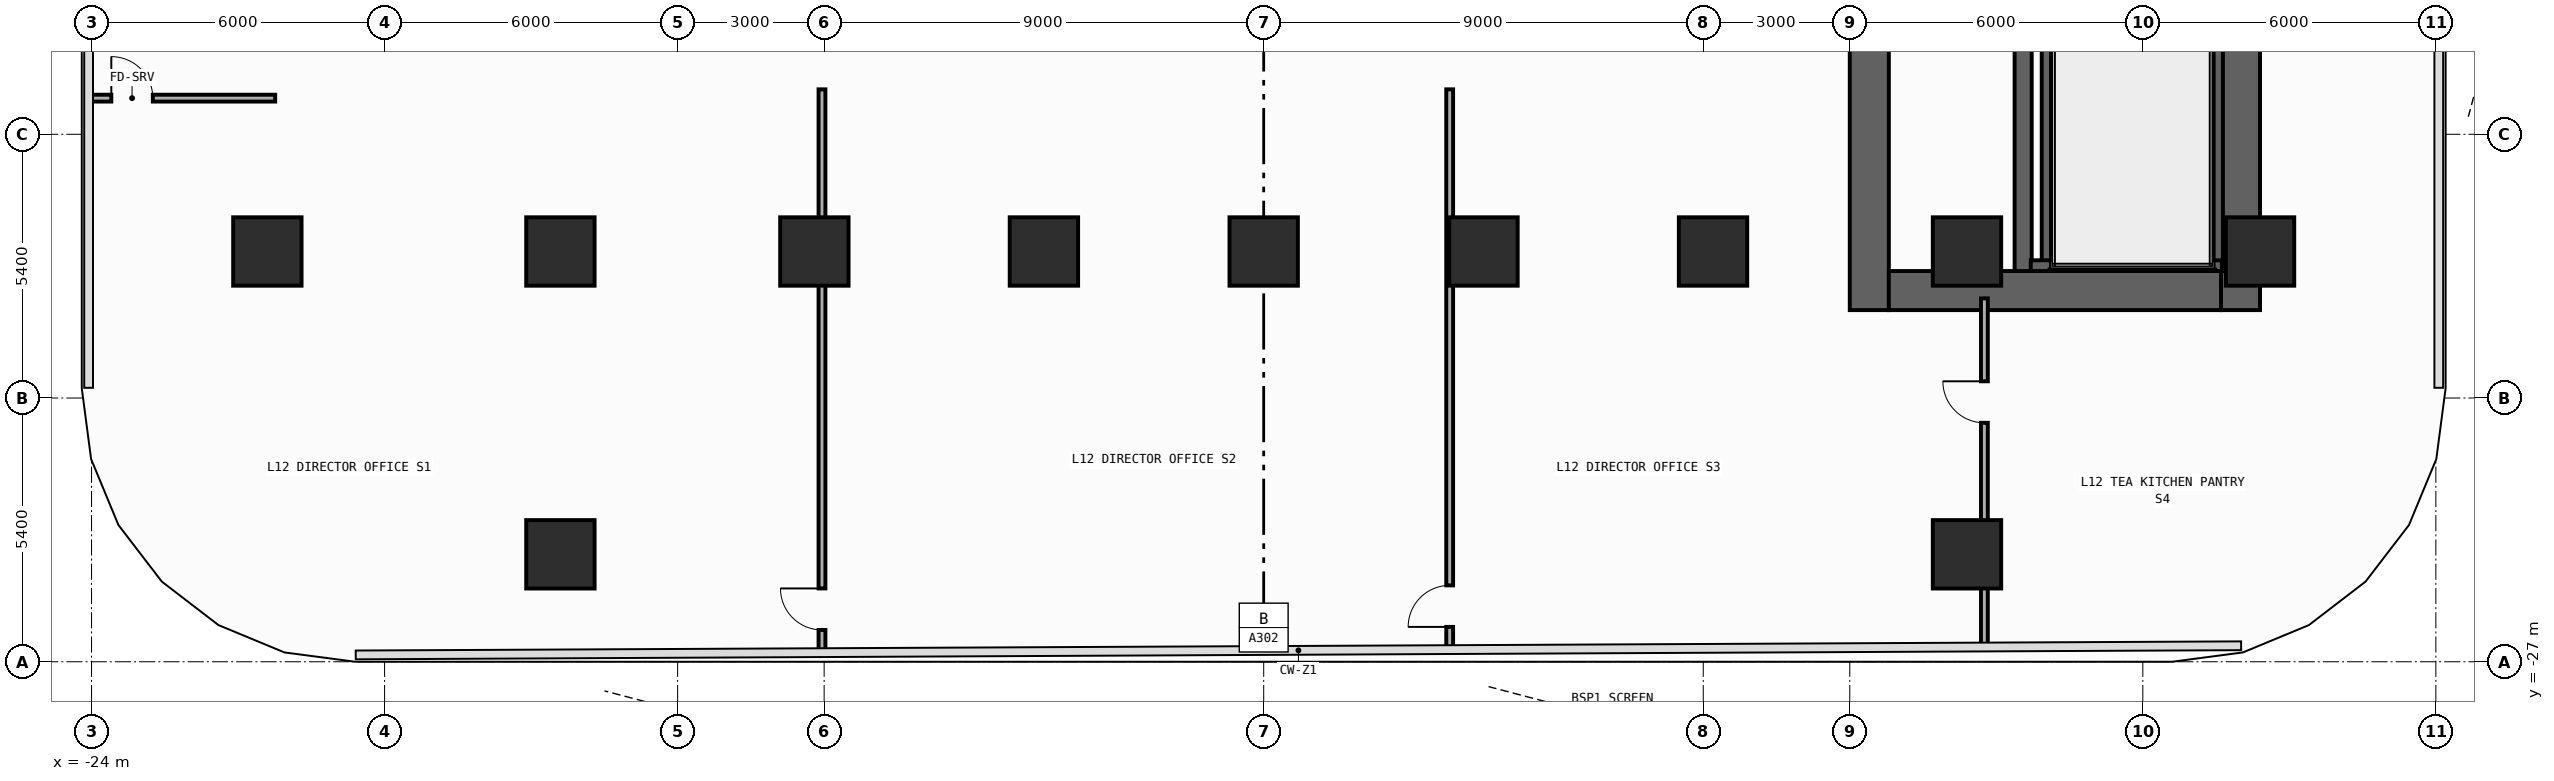
"""IFC4 building model, lengths in metres.
Left out: names, types, materials, properties, quantities, classifications, styles, units other than length and angle.
Written with IfcOpenShell. Run it as: python <this file> out.ifc"""

import sys

from ifc_helpers import new_model, si_unit, direction, frame, frame_2d, origin, origin_2d, place, context, subcontext, project, spatial, rectangle, extrude, element, fill, save


model = new_model("IFC4")
c1 = context("Model", 3, precision=1e-05, world=origin(), true_north=direction((0.0, 1.0)))
c2 = subcontext(c1, "Body", "Model", "MODEL_VIEW")
j1 = project(units=[si_unit("LENGTHUNIT", "METRE"), si_unit("PLANEANGLEUNIT", "RADIAN")], contexts=[c1])
p1 = place(None, origin())
s1 = spatial("IfcSite", under=j1, at=p1, CompositionType="ELEMENT")
p2 = place(p1, origin())
s2 = spatial("IfcBuilding", under=s1, at=p2, CompositionType="ELEMENT")
p3 = place(p2, frame((0.0, 0.0, 51.2)))
s3 = spatial("IfcBuildingStorey", under=s2, at=p3, CompositionType="ELEMENT", Elevation=51.2)
p4 = place(p3, frame((12.4, -19.8, 0.0), z_axis=(0.0, 0.0, 1.0), x_axis=(0.0, 1.0, 0.0)))
e1 = element("IfcWall", 1, at=p4, inside=s3, PredefinedType="SHEAR", context=c2, shape_type="SweptSolid", body=[
    extrude(rectangle(XDim=27.0, YDim=0.8, at=frame_2d((13.5, 0.0))), origin(), (0.0, 0.0, 1.0), 3.94),
])
p5 = place(p4, frame((23.05, 0.0, 0.0)))
e2 = element("IfcOpeningElement", 2, at=p5, cuts=e1, PredefinedType="OPENING", context=c2, shape_type="SweptSolid", body=[
    extrude(rectangle(XDim=1.1, YDim=2.2, at=frame_2d((0.55, 1.1))), frame((0.0, 0.41, 0.0), z_axis=(0.0, -1.0, 0.0), x_axis=(1.0, 0.0, 0.0)), (0.0, 0.0, 1.0), 0.82),
])
p6 = place(p4, frame((19.85, 0.0, 0.0)))
e3 = element("IfcOpeningElement", 3, at=p6, cuts=e1, PredefinedType="OPENING", context=c2, shape_type="SweptSolid", body=[
    extrude(rectangle(XDim=1.1, YDim=2.2, at=frame_2d((0.55, 1.1))), frame((0.0, 0.41, 0.0), z_axis=(0.0, -1.0, 0.0), x_axis=(1.0, 0.0, 0.0)), (0.0, 0.0, 1.0), 0.82),
])
p7 = place(p4, frame((16.65, 0.0, 0.0)))
e4 = element("IfcOpeningElement", 4, at=p7, cuts=e1, PredefinedType="OPENING", context=c2, shape_type="SweptSolid", body=[
    extrude(rectangle(XDim=1.1, YDim=2.2, at=frame_2d((0.55, 1.1))), frame((0.0, 0.41, 0.0), z_axis=(0.0, -1.0, 0.0), x_axis=(1.0, 0.0, 0.0)), (0.0, 0.0, 1.0), 0.82),
])
p8 = place(p4, frame((7.175, 0.0, 0.0)))
e5 = element("IfcOpeningElement", 5, at=p8, cuts=e1, PredefinedType="OPENING", context=c2, shape_type="SweptSolid", body=[
    extrude(rectangle(XDim=0.85, YDim=2.1, at=frame_2d((0.425, 1.05))), frame((0.0, 0.41, 0.0), z_axis=(0.0, -1.0, 0.0), x_axis=(1.0, 0.0, 0.0)), (0.0, 0.0, 1.0), 0.82),
])
p9 = place(p4, frame((10.375, 0.0, 0.0)))
e6 = element("IfcOpeningElement", 6, at=p9, cuts=e1, PredefinedType="OPENING", context=c2, shape_type="SweptSolid", body=[
    extrude(rectangle(XDim=0.85, YDim=2.1, at=frame_2d((0.425, 1.05))), frame((0.0, 0.41, 0.0), z_axis=(0.0, -1.0, 0.0), x_axis=(1.0, 0.0, 0.0)), (0.0, 0.0, 1.0), 0.82),
])
p10 = place(p4, frame((12.725, 0.0, 0.0)))
e7 = element("IfcOpeningElement", 7, at=p10, cuts=e1, PredefinedType="OPENING", context=c2, shape_type="SweptSolid", body=[
    extrude(rectangle(XDim=1.15, YDim=2.2, at=frame_2d((0.575, 1.1))), frame((0.0, 0.41, 0.0), z_axis=(0.0, -1.0, 0.0), x_axis=(1.0, 0.0, 0.0)), (0.0, 0.0, 1.0), 0.82),
])
p11 = place(p4, frame((25.125, 0.0, 0.0)))
e8 = element("IfcOpeningElement", 8, at=p11, cuts=e1, PredefinedType="OPENING", context=c2, shape_type="SweptSolid", body=[
    extrude(rectangle(XDim=0.85, YDim=2.1, at=frame_2d((0.425, 1.05))), frame((0.0, 0.41, 0.0), z_axis=(0.0, -1.0, 0.0), x_axis=(1.0, 0.0, 0.0)), (0.0, 0.0, 1.0), 0.82),
])
p12 = place(p3, frame((20.0, -19.8, 0.0), z_axis=(0.0, 0.0, 1.0), x_axis=(0.0, 1.0, 0.0)))
e9 = element("IfcWall", 9, at=p12, inside=s3, PredefinedType="SHEAR", context=c2, shape_type="SweptSolid", body=[
    extrude(rectangle(XDim=27.0, YDim=0.8, at=frame_2d((13.5, 0.0))), origin(), (0.0, 0.0, 1.0), 3.94),
])
p13 = place(p3, frame((12.8, -19.4, 0.0), z_axis=(0.0, 0.0, 1.0), x_axis=(1.0, 0.0, 0.0)))
e10 = element("IfcWall", 10, at=p13, inside=s3, PredefinedType="SHEAR", context=c2, shape_type="SweptSolid", body=[
    extrude(rectangle(XDim=6.8, YDim=0.8, at=frame_2d((3.4, 0.0))), origin(), (0.0, 0.0, 1.0), 3.94),
])
p14 = place(p3, frame((15.55, -19.0, 0.0), z_axis=(0.0, 0.0, 1.0), x_axis=(0.0, 1.0, 0.0)))
e11 = element("IfcWall", 11, at=p14, inside=s3, PredefinedType="SHEAR", context=c2, shape_type="SweptSolid", body=[
    extrude(rectangle(XDim=25.4, YDim=0.35, at=frame_2d((12.7, 0.0))), origin(), (0.0, 0.0, 1.0), 3.94),
])
p15 = place(p14, frame((11.925, 0.0, 0.0)))
e12 = element("IfcOpeningElement", 12, at=p15, cuts=e11, PredefinedType="OPENING", context=c2, shape_type="SweptSolid", body=[
    extrude(rectangle(XDim=1.15, YDim=2.2, at=frame_2d((0.575, 1.1))), frame((0.0, 0.185, 0.0), z_axis=(0.0, -1.0, 0.0), x_axis=(1.0, 0.0, 0.0)), (0.0, 0.0, 1.0), 0.37),
])
p16 = place(p14, frame((24.325, 0.0, 0.0)))
e13 = element("IfcOpeningElement", 13, at=p16, cuts=e11, PredefinedType="OPENING", context=c2, shape_type="SweptSolid", body=[
    extrude(rectangle(XDim=0.85, YDim=2.1, at=frame_2d((0.425, 1.05))), frame((0.0, 0.185, 0.0), z_axis=(0.0, -1.0, 0.0), x_axis=(1.0, 0.0, 0.0)), (0.0, 0.0, 1.0), 0.37),
])
for number, where, z_axis, x_axis in (
    (14, (16.04, -18.89, 0.0), (0.0, 0.0, 1.0), (0.0, 1.0, 0.0)),
    (15, (19.53, -18.89, 0.0), (0.0, 0.0, 1.0), (0.0, 1.0, 0.0)),
):
    element("IfcWall", number, at=place(p3, frame(where, z_axis=z_axis, x_axis=x_axis)), inside=s3, PredefinedType="SHEAR", context=c2, shape_type="SweptSolid", body=[
        extrude(rectangle(XDim=11.3, YDim=0.22, at=frame_2d((5.65, 0.0))), origin(), (0.0, 0.0, 1.0), 3.94),
    ])
p17 = place(p3, frame((15.705, -18.89, 0.0), z_axis=(0.0, 0.0, 1.0), x_axis=(1.0, 0.0, 0.0)))
e16 = element("IfcWall", 16, at=p17, inside=s3, PredefinedType="SHEAR", context=c2, shape_type="SweptSolid", body=[
    extrude(rectangle(XDim=3.915, YDim=0.22, at=frame_2d((1.958, 0.0))), origin(), (0.0, 0.0, 1.0), 3.94),
])
for number, where, z_axis, x_axis in (
    (17, (-9.2, -18.6, 0.0), (0.0, 0.0, 1.0), (1.0, 0.0, 0.0)),
    (18, (9.2, -18.6, 0.0), (0.0, 0.0, 1.0), (1.0, 0.0, 0.0)),
    (19, (-20.4, -18.6, 0.0), (0.0, 0.0, 1.0), (1.0, 0.0, 0.0)),
    (20, (20.4, -18.6, 0.0), (0.0, 0.0, 1.0), (1.0, 0.0, 0.0)),
    (21, (-14.4, -18.6, 0.0), (0.0, 0.0, 1.0), (1.0, 0.0, 0.0)),
    (22, (14.4, -18.6, 0.0), (0.0, 0.0, 1.0), (1.0, 0.0, 0.0)),
    (23, (-4.5, -18.6, 0.0), (0.0, 0.0, 1.0), (1.0, 0.0, 0.0)),
    (24, (0.0, -18.6, 0.0), (0.0, 0.0, 1.0), (1.0, 0.0, 0.0)),
    (25, (4.5, -18.6, 0.0), (0.0, 0.0, 1.0), (1.0, 0.0, 0.0)),
    (26, (-14.4, -24.8, 0.0), (0.0, 0.0, 1.0), (1.0, 0.0, 0.0)),
    (27, (14.4, -24.8, 0.0), (0.0, 0.0, 1.0), (1.0, 0.0, 0.0)),
):
    element("IfcColumn", number, at=place(p3, frame(where, z_axis=z_axis, x_axis=x_axis)), inside=s3, PredefinedType="COLUMN", context=c2, shape_type="SweptSolid", body=[
        extrude(rectangle(XDim=1.4, YDim=1.4, at=origin_2d()), origin(), (0.0, 0.0, 1.0), 4.2),
    ])
p18 = place(p3, frame((-24.055, -15.46, 0.0), z_axis=(0.0, 0.0, 1.0), x_axis=(1.0, 0.0, 0.0)))
e28 = element("IfcWall", 28, at=p18, inside=s3, PredefinedType="PARTITIONING", context=c2, shape_type="SweptSolid", body=[
    extrude(rectangle(XDim=3.815, YDim=0.14, at=frame_2d((1.907, 0.0))), origin(), (0.0, 0.0, 1.0), 3.94),
])
p19 = place(p18, frame((0.46, 0.0, 0.0)))
e29 = element("IfcOpeningElement", 29, at=p19, cuts=e28, PredefinedType="OPENING", context=c2, shape_type="SweptSolid", body=[
    extrude(rectangle(XDim=0.85, YDim=2.1, at=frame_2d((0.425, 1.05))), frame((0.0, 0.08, 0.0), z_axis=(0.0, -1.0, 0.0), x_axis=(1.0, 0.0, 0.0)), (0.0, 0.0, 1.0), 0.16),
])
p20 = place(p3, frame((-9.044, -26.809, 0.0), z_axis=(0.0, 0.0, 1.0), x_axis=(0.0, 1.0, 0.0)))
e30 = element("IfcWall", 30, at=p20, inside=s3, PredefinedType="PARTITIONING", context=c2, shape_type="SweptSolid", body=[
    extrude(rectangle(XDim=11.529, YDim=0.14, at=frame_2d((5.764, 0.0))), origin(), (0.0, 0.0, 1.0), 3.14),
])
p21 = place(p20, frame((0.46, 0.0, 0.0)))
e31 = element("IfcOpeningElement", 31, at=p21, cuts=e30, PredefinedType="OPENING", context=c2, shape_type="SweptSolid", body=[
    extrude(rectangle(XDim=0.85, YDim=2.1, at=frame_2d((0.425, 1.05))), frame((0.0, 0.08, 0.0), z_axis=(0.0, -1.0, 0.0), x_axis=(1.0, 0.0, 0.0)), (0.0, 0.0, 1.0), 0.16),
])
p22 = place(p3, frame((3.808, -26.746, 0.0), z_axis=(0.0, 0.0, 1.0), x_axis=(0.0, 1.0, 0.0)))
e32 = element("IfcWall", 32, at=p22, inside=s3, PredefinedType="PARTITIONING", context=c2, shape_type="SweptSolid", body=[
    extrude(rectangle(XDim=11.466, YDim=0.14, at=frame_2d((5.733, 0.0))), origin(), (0.0, 0.0, 1.0), 3.94),
])
p23 = place(p22, frame((0.46, 0.0, 0.0)))
e33 = element("IfcOpeningElement", 33, at=p23, cuts=e32, PredefinedType="OPENING", context=c2, shape_type="SweptSolid", body=[
    extrude(rectangle(XDim=0.85, YDim=2.1, at=frame_2d((0.425, 1.05))), frame((0.0, 0.08, 0.0), z_axis=(0.0, -1.0, 0.0), x_axis=(1.0, 0.0, 0.0)), (0.0, 0.0, 1.0), 0.16),
])
p24 = place(p3, frame((14.756, -26.693, 0.0), z_axis=(0.0, 0.0, 1.0), x_axis=(0.0, 1.0, 0.0)))
e34 = element("IfcWall", 34, at=p24, inside=s3, PredefinedType="PARTITIONING", context=c2, shape_type="SweptSolid", body=[
    extrude(rectangle(XDim=7.133, YDim=0.14, at=frame_2d((3.567, 0.0))), origin(), (0.0, 0.0, 1.0), 3.94),
])
p25 = place(p24, frame((4.586, 0.0, 0.0)))
e35 = element("IfcOpeningElement", 35, at=p25, cuts=e34, PredefinedType="OPENING", context=c2, shape_type="SweptSolid", body=[
    extrude(rectangle(XDim=0.85, YDim=2.1, at=frame_2d((0.425, 1.05))), frame((0.0, 0.08, 0.0), z_axis=(0.0, -1.0, 0.0), x_axis=(1.0, 0.0, 0.0)), (0.0, 0.0, 1.0), 0.16),
])
p26 = place(p19, origin())
e36 = element("IfcDoor", 36, at=p26, inside=s3, OperationType="SINGLE_SWING_LEFT", PredefinedType="DOOR", context=c2, shape_type="SweptSolid", body=[
    extrude(rectangle(XDim=0.85, YDim=2.1, at=frame_2d((0.425, 1.05))), frame((0.0, 0.025, 0.0), z_axis=(0.0, -1.0, 0.0), x_axis=(1.0, 0.0, 0.0)), (0.0, 0.0, 1.0), 0.05),
])
fill(e29, e36)
p27 = place(p21, origin())
e37 = element("IfcDoor", 37, at=p27, inside=s3, OperationType="SINGLE_SWING_RIGHT", PredefinedType="DOOR", context=c2, shape_type="SweptSolid", body=[
    extrude(rectangle(XDim=0.85, YDim=2.1, at=frame_2d((0.425, 1.05))), frame((0.0, 0.025, 0.0), z_axis=(0.0, -1.0, 0.0), x_axis=(1.0, 0.0, 0.0)), (0.0, 0.0, 1.0), 0.05),
])
fill(e31, e37)
p28 = place(p23, origin())
e38 = element("IfcDoor", 38, at=p28, inside=s3, OperationType="SINGLE_SWING_LEFT", PredefinedType="DOOR", context=c2, shape_type="SweptSolid", body=[
    extrude(rectangle(XDim=0.85, YDim=2.1, at=frame_2d((0.425, 1.05))), frame((0.0, 0.025, 0.0), z_axis=(0.0, -1.0, 0.0), x_axis=(1.0, 0.0, 0.0)), (0.0, 0.0, 1.0), 0.05),
])
fill(e33, e38)
p29 = place(p25, origin())
e39 = element("IfcDoor", 39, at=p29, inside=s3, OperationType="SINGLE_SWING_RIGHT", PredefinedType="DOOR", context=c2, shape_type="SweptSolid", body=[
    extrude(rectangle(XDim=0.85, YDim=2.1, at=frame_2d((0.425, 1.05))), frame((0.0, 0.025, 0.0), z_axis=(0.0, -1.0, 0.0), x_axis=(1.0, 0.0, 0.0)), (0.0, 0.0, 1.0), 0.05),
])
fill(e35, e39)
save(model, sys.argv[1])
